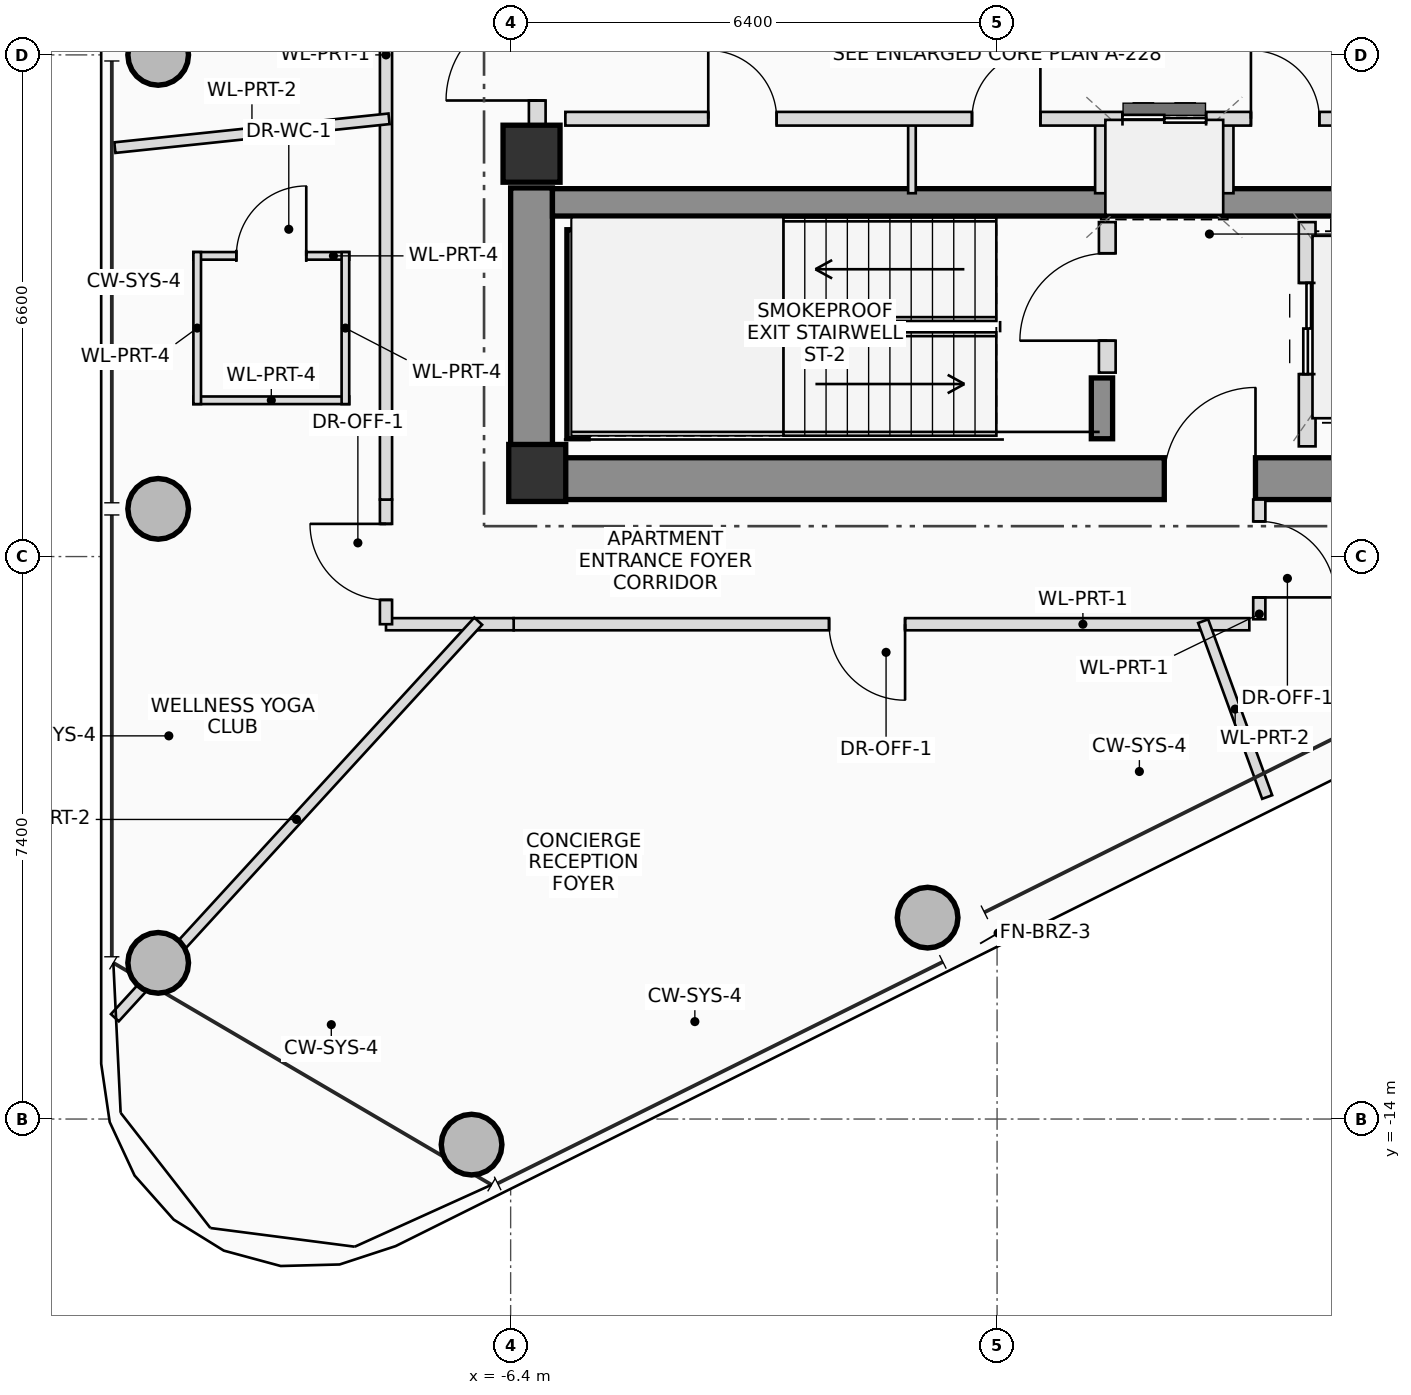
"""IFC4 building model, lengths in metres.
Left out: names, types, materials, properties, quantities, classifications, styles, units other than length and angle.
Written with IfcOpenShell. Run it as: python <this file> out.ifc"""

import sys

from ifc_helpers import new_model, si_unit, direction, frame, frame_2d, origin, origin_2d, place, context, subcontext, project, spatial, rectangle, hollow_circle, extrude, source, transform, mapped, element, fill, save


model = new_model("IFC4")
c1 = context("Model", 3, precision=1e-05, world=origin(), true_north=direction((0.0, 1.0)))
c2 = subcontext(c1, "Body", "Model", "MODEL_VIEW")
j1 = project(units=[si_unit("LENGTHUNIT", "METRE"), si_unit("PLANEANGLEUNIT", "RADIAN")], contexts=[c1])
p1 = place(None, origin())
s1 = spatial("IfcSite", under=j1, at=p1, CompositionType="ELEMENT")
p2 = place(p1, origin())
s2 = spatial("IfcBuilding", under=s1, at=p2, CompositionType="ELEMENT")
p3 = place(p2, frame((0.0, 0.0, 314.0)))
s3 = spatial("IfcBuildingStorey", under=s2, at=p3, CompositionType="ELEMENT", Elevation=314.0)
m1 = source(origin(), c2, "Body", "SweptSolid", [
    extrude(rectangle(XDim=0.75, YDim=0.75, at=origin_2d()), origin(), (0.0, 0.0, 1.0), 3.45),
])
p4 = place(p3, frame((-6.05, -5.5, 0.0), z_axis=(0.0, 0.0, 1.0), x_axis=(1.0, 0.0, 0.0)))
e1 = element("IfcColumn", 1, at=p4, inside=s3, PredefinedType="COLUMN", context=c2, shape_type="MappedRepresentation", body=[
    mapped(m1, transform((0.0, 0.0, 0.0), scale=1.0)),
])
p5 = place(p3, frame((-6.4, -5.575, 0.0), z_axis=(0.0, 0.0, 1.0), x_axis=(1.0, 0.0, 0.0)))
e2 = element("IfcWall", 2, at=p5, inside=s3, PredefinedType="SHEAR", context=c2, shape_type="SweptSolid", body=[
    extrude(rectangle(XDim=12.8, YDim=0.55, at=frame_2d((6.4, 0.0))), origin(), (0.0, 0.0, 1.0), 3.45),
])
p6 = place(p5, frame((8.6, 0.0, 0.0)))
e3 = element("IfcOpeningElement", 3, at=p6, cuts=e2, PredefinedType="OPENING", context=c2, shape_type="SweptSolid", body=[
    extrude(rectangle(XDim=1.2, YDim=2.2, at=frame_2d((0.6, 1.1))), frame((0.0, 0.285, 0.0), z_axis=(0.0, -1.0, 0.0), x_axis=(1.0, 0.0, 0.0)), (0.0, 0.0, 1.0), 0.57),
])
p7 = place(p3, frame((-6.125, -5.3, 0.0), z_axis=(0.0, 0.0, 1.0), x_axis=(0.0, 1.0, 0.0)))
e4 = element("IfcWall", 4, at=p7, inside=s3, PredefinedType="SHEAR", context=c2, shape_type="SweptSolid", body=[
    extrude(rectangle(XDim=3.55, YDim=0.55, at=frame_2d((1.775, 0.0))), origin(), (0.0, 0.0, 1.0), 3.45),
])
p8 = place(p3, frame((-5.85, -1.94, 0.0), z_axis=(0.0, 0.0, 1.0), x_axis=(1.0, 0.0, 0.0)))
e5 = element("IfcWall", 5, at=p8, inside=s3, PredefinedType="SHEAR", context=c2, shape_type="SweptSolid", body=[
    extrude(rectangle(XDim=11.7, YDim=0.36, at=frame_2d((5.85, 0.0))), origin(), (0.0, 0.0, 1.0), 3.45),
])
p9 = place(p3, frame((-5.52, -5.05, 0.0), z_axis=(0.0, 0.0, 1.0), x_axis=(0.0, 1.0, 0.0)))
e6 = element("IfcWall", 6, at=p9, inside=s3, PredefinedType="SHEAR", context=c2, shape_type="SweptSolid", body=[
    extrude(rectangle(XDim=2.75, YDim=0.28, at=frame_2d((1.375, 0.0))), origin(), (0.0, 0.0, 1.0), 3.45),
])
p10 = place(p3, frame((1.38, -5.05, 0.0), z_axis=(0.0, 0.0, 1.0), x_axis=(0.0, 1.0, 0.0)))
e7 = element("IfcWall", 7, at=p10, inside=s3, PredefinedType="SHEAR", context=c2, shape_type="SweptSolid", body=[
    extrude(rectangle(XDim=0.8, YDim=0.28, at=frame_2d((0.4, 0.0))), origin(), (0.0, 0.0, 1.0), 3.45),
])
p11 = place(p3, frame((-6.125, -1.3, 0.0), z_axis=(0.0, 0.0, 1.0), x_axis=(1.0, 0.0, 0.0)))
e8 = element("IfcColumn", 8, at=p11, inside=s3, PredefinedType="COLUMN", context=c2, shape_type="MappedRepresentation", body=[
    mapped(m1, transform((0.0, 0.0, 0.0), scale=1.0)),
])
m2 = source(origin(), c2, "Body", "SweptSolid", [
    extrude(hollow_circle(Radius=0.4, WallThickness=0.028, at=origin_2d()), origin(), (0.0, 0.0, 1.0), 3.19),
])
for number, where, z_axis, x_axis in (
    (9, (-6.914, -14.337, 0.0), (0.0, 0.0, 1.0), (1.0, 0.0, 0.0)),
    (10, (-0.914, -11.35, 0.0), (0.0, 0.0, 1.0), (1.0, 0.0, 0.0)),
    (11, (-11.037, 0.0, 0.0), (0.0, 0.0, 1.0), (1.0, 0.0, 0.0)),
    (12, (-11.037, -5.973, 0.0), (0.0, 0.0, 1.0), (1.0, 0.0, 0.0)),
    (13, (-11.037, -11.945, 0.0), (0.0, 0.0, 1.0), (1.0, 0.0, 0.0)),
):
    element("IfcColumn", number, at=place(p3, frame(where, z_axis=z_axis, x_axis=x_axis)), inside=s3, PredefinedType="COLUMN", context=c2, shape_type="MappedRepresentation", body=[
        mapped(m2, transform((0.0, 0.0, 0.0), scale=1.0)),
    ])
p12 = place(p3, frame((-6.05, -0.95, 0.0), z_axis=(0.0, 0.0, 1.0), x_axis=(0.0, 1.0, 0.0)))
e14 = element("IfcWall", 14, at=p12, inside=s3, PredefinedType="PLUMBINGWALL", context=c2, shape_type="SweptSolid", body=[
    extrude(rectangle(XDim=1.9, YDim=0.22, at=frame_2d((0.95, 0.0))), origin(), (0.0, 0.0, 1.0), 2.15),
])
p13 = place(p12, frame((0.35, 0.0, 0.0)))
e15 = element("IfcOpeningElement", 15, at=p13, cuts=e14, PredefinedType="OPENING", context=c2, shape_type="SweptSolid", body=[
    extrude(rectangle(XDim=1.2, YDim=2.2, at=frame_2d((0.6, 1.1))), frame((0.0, 0.12, 0.0), z_axis=(0.0, -1.0, 0.0), x_axis=(1.0, 0.0, 0.0)), (0.0, 0.0, 1.0), 0.24),
])
p14 = place(p3, frame((1.45, -4.18, 0.0), z_axis=(0.0, 0.0, 1.0), x_axis=(0.0, 1.0, 0.0)))
e16 = element("IfcWall", 16, at=p14, inside=s3, PredefinedType="PLUMBINGWALL", context=c2, shape_type="SweptSolid", body=[
    extrude(rectangle(XDim=1.98, YDim=0.22, at=frame_2d((0.99, 0.0))), origin(), (0.0, 0.0, 1.0), 3.17),
])
p15 = place(p14, frame((0.42, 0.0, 0.0)))
e17 = element("IfcOpeningElement", 17, at=p15, cuts=e16, PredefinedType="OPENING", context=c2, shape_type="SweptSolid", body=[
    extrude(rectangle(XDim=1.15, YDim=2.15, at=frame_2d((0.575, 1.075))), frame((0.0, 0.12, 0.0), z_axis=(0.0, -1.0, 0.0), x_axis=(1.0, 0.0, 0.0)), (0.0, 0.0, 1.0), 0.24),
])
p16 = place(p3, frame((4.08, -5.15, 0.0), z_axis=(0.0, 0.0, 1.0), x_axis=(0.0, 1.0, 0.0)))
e18 = element("IfcWall", 18, at=p16, inside=s3, PredefinedType="PLUMBINGWALL", context=c2, shape_type="SweptSolid", body=[
    extrude(rectangle(XDim=2.95, YDim=0.22, at=frame_2d((1.475, 0.0))), origin(), (0.0, 0.0, 1.0), 3.17),
])
p17 = place(p16, frame((0.95, 0.0, 0.0)))
e19 = element("IfcOpeningElement", 19, at=p17, cuts=e18, PredefinedType="OPENING", context=c2, shape_type="SweptSolid", body=[
    extrude(rectangle(XDim=1.2, YDim=2.25, at=frame_2d((0.6, 1.125))), frame((0.0, 0.12, 0.0), z_axis=(0.0, -1.0, 0.0), x_axis=(1.0, 0.0, 0.0)), (0.0, 0.0, 1.0), 0.24),
])
p18 = place(p3, frame((-1.12, -1.82, 0.0), z_axis=(0.0, 0.0, 1.0), x_axis=(0.0, 1.0, 0.0)))
e20 = element("IfcWall", 20, at=p18, inside=s3, PredefinedType="PARTITIONING", context=c2, shape_type="SweptSolid", body=[
    extrude(rectangle(XDim=0.98, YDim=0.1, at=frame_2d((0.49, 0.0))), origin(), (0.0, 0.0, 1.0), 3.17),
])
for number, where, z_axis, x_axis in (
    (21, (1.38, -1.82, 0.0), (0.0, 0.0, 1.0), (0.0, 1.0, 0.0)),
    (22, (3.02, -1.82, 0.0), (0.0, 0.0, 1.0), (0.0, 1.0, 0.0)),
):
    element("IfcWall", number, at=place(p3, frame(where, z_axis=z_axis, x_axis=x_axis)), inside=s3, PredefinedType="PLUMBINGWALL", context=c2, shape_type="SweptSolid", body=[
        extrude(rectangle(XDim=0.98, YDim=0.18, at=frame_2d((0.49, 0.0))), origin(), (0.0, 0.0, 1.0), 3.17),
    ])
p19 = place(p3, frame((-5.68, -0.84, 0.0), z_axis=(0.0, 0.0, 1.0), x_axis=(1.0, 0.0, 0.0)))
e23 = element("IfcWall", 23, at=p19, inside=s3, PredefinedType="PLUMBINGWALL", context=c2, shape_type="SweptSolid", body=[
    extrude(rectangle(XDim=10.22, YDim=0.18, at=frame_2d((5.11, 0.0))), origin(), (0.0, 0.0, 1.0), 3.17),
])
p20 = place(p19, frame((1.88, 0.0, 0.0)))
e24 = element("IfcOpeningElement", 24, at=p20, cuts=e23, PredefinedType="OPENING", context=c2, shape_type="SweptSolid", body=[
    extrude(rectangle(XDim=0.9, YDim=2.05, at=frame_2d((0.45, 1.025))), frame((0.0, 0.1, 0.0), z_axis=(0.0, -1.0, 0.0), x_axis=(1.0, 0.0, 0.0)), (0.0, 0.0, 1.0), 0.2),
])
p21 = place(p19, frame((5.35, 0.0, 0.0)))
e25 = element("IfcOpeningElement", 25, at=p21, cuts=e23, PredefinedType="OPENING", context=c2, shape_type="SweptSolid", body=[
    extrude(rectangle(XDim=0.9, YDim=2.05, at=frame_2d((0.45, 1.025))), frame((0.0, 0.1, 0.0), z_axis=(0.0, -1.0, 0.0), x_axis=(1.0, 0.0, 0.0)), (0.0, 0.0, 1.0), 0.2),
])
p22 = place(p19, frame((7.33, 0.0, 0.0)))
e26 = element("IfcOpeningElement", 26, at=p22, cuts=e23, PredefinedType="OPENING", context=c2, shape_type="SweptSolid", body=[
    extrude(rectangle(XDim=1.1, YDim=2.2, at=frame_2d((0.55, 1.1))), frame((0.0, 0.1, 0.0), z_axis=(0.0, -1.0, 0.0), x_axis=(1.0, 0.0, 0.0)), (0.0, 0.0, 1.0), 0.2),
])
p23 = place(p19, frame((9.02, 0.0, 0.0)))
e27 = element("IfcOpeningElement", 27, at=p23, cuts=e23, PredefinedType="OPENING", context=c2, shape_type="SweptSolid", body=[
    extrude(rectangle(XDim=0.9, YDim=2.05, at=frame_2d((0.45, 1.025))), frame((0.0, 0.1, 0.0), z_axis=(0.0, -1.0, 0.0), x_axis=(1.0, 0.0, 0.0)), (0.0, 0.0, 1.0), 0.2),
])
p24 = place(p3, frame((-10.574, -2.644, 0.0), z_axis=(0.0, 0.0, 1.0), x_axis=(1.0, 0.0, 0.0)))
e28 = element("IfcWall", 28, at=p24, inside=s3, PredefinedType="PARTITIONING", context=c2, shape_type="SweptSolid", body=[
    extrude(rectangle(XDim=2.05, YDim=0.1, at=frame_2d((1.025, 0.0))), origin(), (0.0, 0.0, 1.0), 2.575),
])
p25 = place(p24, frame((0.565, 0.0, 0.0)))
e29 = element("IfcOpeningElement", 29, at=p25, cuts=e28, PredefinedType="OPENING", context=c2, shape_type="SweptSolid", body=[
    extrude(rectangle(XDim=0.92, YDim=2.1, at=frame_2d((0.46, 1.05))), frame((0.0, 0.06, 0.0), z_axis=(0.0, -1.0, 0.0), x_axis=(1.0, 0.0, 0.0)), (0.0, 0.0, 1.0), 0.12),
])
p26 = place(p3, frame((-8.524, -4.544, 0.0), z_axis=(0.0, 0.0, 1.0), x_axis=(-1.0, 0.0, 0.0)))
e30 = element("IfcWall", 30, at=p26, inside=s3, PredefinedType="PARTITIONING", context=c2, shape_type="SweptSolid", body=[
    extrude(rectangle(XDim=2.05, YDim=0.1, at=frame_2d((1.025, 0.0))), origin(), (0.0, 0.0, 1.0), 2.775),
])
p27 = place(p3, frame((-8.574, -2.594, 0.0), z_axis=(0.0, 0.0, 1.0), x_axis=(0.0, -1.0, 0.0)))
e31 = element("IfcWall", 31, at=p27, inside=s3, PredefinedType="PARTITIONING", context=c2, shape_type="SweptSolid", body=[
    extrude(rectangle(XDim=2.0, YDim=0.1, at=frame_2d((1.0, 0.0))), origin(), (0.0, 0.0, 1.0), 2.575),
])
p28 = place(p3, frame((-10.524, -4.594, 0.0), z_axis=(0.0, 0.0, 1.0), x_axis=(0.0, 1.0, 0.0)))
e32 = element("IfcWall", 32, at=p28, inside=s3, PredefinedType="PARTITIONING", context=c2, shape_type="SweptSolid", body=[
    extrude(rectangle(XDim=2.0, YDim=0.1, at=frame_2d((1.0, 0.0))), origin(), (0.0, 0.0, 1.0), 3.17),
])
p29 = place(p3, frame((3.45, -5.85, 0.0), z_axis=(0.0, 0.0, 1.0), x_axis=(0.0, -1.0, 0.0)))
e33 = element("IfcWall", 33, at=p29, inside=s3, PredefinedType="PARTITIONING", context=c2, shape_type="SweptSolid", body=[
    extrude(rectangle(XDim=1.575, YDim=0.16, at=frame_2d((0.787, 0.0))), origin(), (0.0, 0.0, 1.0), 2.775),
])
p30 = place(p29, frame((0.287, 0.0, 0.0)))
e34 = element("IfcOpeningElement", 34, at=p30, cuts=e33, PredefinedType="OPENING", context=c2, shape_type="SweptSolid", body=[
    extrude(rectangle(XDim=1.0, YDim=2.25, at=frame_2d((0.5, 1.125))), frame((0.0, 0.09, 0.0), z_axis=(0.0, -1.0, 0.0), x_axis=(1.0, 0.0, 0.0)), (0.0, 0.0, 1.0), 0.18),
])
p31 = place(p3, frame((3.319, -7.49, 0.0), z_axis=(0.0, 0.0, 1.0), x_axis=(-1.0, 0.0, 0.0)))
e35 = element("IfcWall", 35, at=p31, inside=s3, PredefinedType="PARTITIONING", context=c2, shape_type="SweptSolid", body=[
    extrude(rectangle(XDim=9.679, YDim=0.16, at=frame_2d((4.84, 0.0))), origin(), (0.0, 0.0, 1.0), 2.575),
])
p32 = place(p31, frame((4.53, 0.0, 0.0)))
e36 = element("IfcOpeningElement", 36, at=p32, cuts=e35, PredefinedType="OPENING", context=c2, shape_type="SweptSolid", body=[
    extrude(rectangle(XDim=1.0, YDim=2.25, at=frame_2d((0.5, 1.125))), frame((0.0, 0.09, 0.0), z_axis=(0.0, -1.0, 0.0), x_axis=(1.0, 0.0, 0.0)), (0.0, 0.0, 1.0), 0.18),
])
p33 = place(p3, frame((-6.36, -7.49, 0.0), z_axis=(0.0, 0.0, 1.0), x_axis=(-1.0, 0.0, 0.0)))
e37 = element("IfcWall", 37, at=p33, inside=s3, PredefinedType="PARTITIONING", context=c2, shape_type="SweptSolid", body=[
    extrude(rectangle(XDim=1.68, YDim=0.16, at=frame_2d((0.84, 0.0))), origin(), (0.0, 0.0, 1.0), 2.575),
])
p34 = place(p3, frame((-8.04, -7.49, 0.0), z_axis=(0.0, 0.0, 1.0), x_axis=(0.0, 1.0, 0.0)))
e38 = element("IfcWall", 38, at=p34, inside=s3, PredefinedType="PARTITIONING", context=c2, shape_type="SweptSolid", body=[
    extrude(rectangle(XDim=1.64, YDim=0.16, at=frame_2d((0.82, 0.0))), origin(), (0.0, 0.0, 1.0), 3.17),
])
p35 = place(p34, frame((0.32, 0.0, 0.0)))
e39 = element("IfcOpeningElement", 39, at=p35, cuts=e38, PredefinedType="OPENING", context=c2, shape_type="SweptSolid", body=[
    extrude(rectangle(XDim=1.0, YDim=2.25, at=frame_2d((0.5, 1.125))), frame((0.0, 0.09, 0.0), z_axis=(0.0, -1.0, 0.0), x_axis=(1.0, 0.0, 0.0)), (0.0, 0.0, 1.0), 0.18),
])
p36 = place(p3, frame((-8.04, -5.85, 0.0), z_axis=(0.0, 0.0, 1.0), x_axis=(0.0, 1.0, 0.0)))
e40 = element("IfcWall", 40, at=p36, inside=s3, PredefinedType="PARTITIONING", context=c2, shape_type="SweptSolid", body=[
    extrude(rectangle(XDim=11.7, YDim=0.16, at=frame_2d((5.85, 0.0))), origin(), (0.0, 0.0, 1.0), 2.575),
])
p37 = place(p3, frame((-8.0, -0.841, 0.0), z_axis=(0.0, 0.0, 1.0), x_axis=(-0.994522036567, -0.104527119842, 0.0)))
e41 = element("IfcWall", 41, at=p37, inside=s3, PredefinedType="PARTITIONING", context=c2, shape_type="SweptSolid", body=[
    extrude(rectangle(XDim=3.627, YDim=0.14, at=frame_2d((1.813, 0.0))), origin(), (0.0, 0.0, 1.0), 2.575),
])
p38 = place(p3, frame((-6.827, -7.45, 0.0), z_axis=(0.0, 0.0, 1.0), x_axis=(-0.675607445236, -0.737261541071, 0.0)))
e42 = element("IfcWall", 42, at=p38, inside=s3, PredefinedType="PARTITIONING", context=c2, shape_type="SweptSolid", body=[
    extrude(rectangle(XDim=7.076, YDim=0.14, at=frame_2d((3.538, 0.0))), origin(), (0.0, 0.0, 1.0), 2.575),
])
p39 = place(p3, frame((2.712, -7.45, 0.0), z_axis=(0.0, 0.0, 1.0), x_axis=(0.341989856239, -0.939703643831, 0.0)))
e43 = element("IfcWall", 43, at=p39, inside=s3, PredefinedType="PARTITIONING", context=c2, shape_type="SweptSolid", body=[
    extrude(rectangle(XDim=2.462, YDim=0.14, at=frame_2d((1.231, 0.0))), origin(), (0.0, 0.0, 1.0), 2.735),
])
p40 = place(p6, origin())
e44 = element("IfcDoor", 44, at=p40, inside=s3, OperationType="SINGLE_SWING_RIGHT", PredefinedType="DOOR", context=c2, shape_type="SweptSolid", body=[
    extrude(rectangle(XDim=1.2, YDim=2.2, at=frame_2d((0.6, 1.1))), frame((0.0, 0.025, 0.0), z_axis=(0.0, -1.0, 0.0), x_axis=(1.0, 0.0, 0.0)), (0.0, 0.0, 1.0), 0.05),
])
fill(e3, e44)
p41 = place(p13, origin())
e45 = element("IfcDoor", 45, at=p41, inside=s3, OperationType="SINGLE_SWING_LEFT", PredefinedType="DOOR", context=c2, shape_type="SweptSolid", body=[
    extrude(rectangle(XDim=1.2, YDim=2.2, at=frame_2d((0.6, 1.1))), frame((0.0, 0.025, 0.0), z_axis=(0.0, -1.0, 0.0), x_axis=(1.0, 0.0, 0.0)), (0.0, 0.0, 1.0), 0.05),
])
fill(e15, e45)
p42 = place(p15, origin())
e46 = element("IfcDoor", 46, at=p42, inside=s3, OperationType="SINGLE_SWING_LEFT", PredefinedType="DOOR", context=c2, shape_type="SweptSolid", body=[
    extrude(rectangle(XDim=1.15, YDim=2.15, at=frame_2d((0.575, 1.075))), frame((0.0, 0.025, 0.0), z_axis=(0.0, -1.0, 0.0), x_axis=(1.0, 0.0, 0.0)), (0.0, 0.0, 1.0), 0.05),
])
fill(e17, e46)
p43 = place(p17, origin())
e47 = element("IfcDoor", 47, at=p43, inside=s3, OperationType="DOUBLE_DOOR_SLIDING", PredefinedType="DOOR", context=c2, shape_type="SweptSolid", body=[
    extrude(rectangle(XDim=1.2, YDim=2.25, at=frame_2d((0.6, 1.125))), frame((0.0, 0.025, 0.0), z_axis=(0.0, -1.0, 0.0), x_axis=(1.0, 0.0, 0.0)), (0.0, 0.0, 1.0), 0.05),
])
fill(e19, e47)
p44 = place(p20, origin())
e48 = element("IfcDoor", 48, at=p44, inside=s3, OperationType="SINGLE_SWING_LEFT", PredefinedType="DOOR", context=c2, shape_type="SweptSolid", body=[
    extrude(rectangle(XDim=0.9, YDim=2.05, at=frame_2d((0.45, 1.025))), frame((0.0, 0.025, 0.0), z_axis=(0.0, -1.0, 0.0), x_axis=(1.0, 0.0, 0.0)), (0.0, 0.0, 1.0), 0.05),
])
fill(e24, e48)
p45 = place(p21, origin())
e49 = element("IfcDoor", 49, at=p45, inside=s3, OperationType="SINGLE_SWING_RIGHT", PredefinedType="DOOR", context=c2, shape_type="SweptSolid", body=[
    extrude(rectangle(XDim=0.9, YDim=2.05, at=frame_2d((0.45, 1.025))), frame((0.0, 0.025, 0.0), z_axis=(0.0, -1.0, 0.0), x_axis=(1.0, 0.0, 0.0)), (0.0, 0.0, 1.0), 0.05),
])
fill(e25, e49)
p46 = place(p22, origin())
e50 = element("IfcDoor", 50, at=p46, inside=s3, OperationType="DOUBLE_DOOR_SLIDING", PredefinedType="DOOR", context=c2, shape_type="SweptSolid", body=[
    extrude(rectangle(XDim=1.1, YDim=2.2, at=frame_2d((0.55, 1.1))), frame((0.0, 0.025, 0.0), z_axis=(0.0, -1.0, 0.0), x_axis=(1.0, 0.0, 0.0)), (0.0, 0.0, 1.0), 0.05),
])
fill(e26, e50)
p47 = place(p23, origin())
e51 = element("IfcDoor", 51, at=p47, inside=s3, OperationType="SINGLE_SWING_LEFT", PredefinedType="DOOR", context=c2, shape_type="SweptSolid", body=[
    extrude(rectangle(XDim=0.9, YDim=2.05, at=frame_2d((0.45, 1.025))), frame((0.0, 0.025, 0.0), z_axis=(0.0, -1.0, 0.0), x_axis=(1.0, 0.0, 0.0)), (0.0, 0.0, 1.0), 0.05),
])
fill(e27, e51)
p48 = place(p25, origin())
e52 = element("IfcDoor", 52, at=p48, inside=s3, OperationType="SINGLE_SWING_RIGHT", PredefinedType="DOOR", context=c2, shape_type="SweptSolid", body=[
    extrude(rectangle(XDim=0.92, YDim=2.1, at=frame_2d((0.46, 1.05))), frame((0.0, 0.025, 0.0), z_axis=(0.0, -1.0, 0.0), x_axis=(1.0, 0.0, 0.0)), (0.0, 0.0, 1.0), 0.05),
])
fill(e29, e52)
p49 = place(p30, origin())
e53 = element("IfcDoor", 53, at=p49, inside=s3, OperationType="SINGLE_SWING_RIGHT", PredefinedType="DOOR", context=c2, shape_type="SweptSolid", body=[
    extrude(rectangle(XDim=1.0, YDim=2.25, at=frame_2d((0.5, 1.125))), frame((0.0, 0.025, 0.0), z_axis=(0.0, -1.0, 0.0), x_axis=(1.0, 0.0, 0.0)), (0.0, 0.0, 1.0), 0.05),
])
fill(e34, e53)
p50 = place(p32, origin())
e54 = element("IfcDoor", 54, at=p50, inside=s3, OperationType="SINGLE_SWING_LEFT", PredefinedType="DOOR", context=c2, shape_type="SweptSolid", body=[
    extrude(rectangle(XDim=1.0, YDim=2.25, at=frame_2d((0.5, 1.125))), frame((0.0, 0.025, 0.0), z_axis=(0.0, -1.0, 0.0), x_axis=(1.0, 0.0, 0.0)), (0.0, 0.0, 1.0), 0.05),
])
fill(e36, e54)
p51 = place(p35, origin())
e55 = element("IfcDoor", 55, at=p51, inside=s3, OperationType="SINGLE_SWING_RIGHT", PredefinedType="DOOR", context=c2, shape_type="SweptSolid", body=[
    extrude(rectangle(XDim=1.0, YDim=2.25, at=frame_2d((0.5, 1.125))), frame((0.0, 0.025, 0.0), z_axis=(0.0, -1.0, 0.0), x_axis=(1.0, 0.0, 0.0)), (0.0, 0.0, 1.0), 0.05),
])
fill(e39, e55)
save(model, sys.argv[1])
